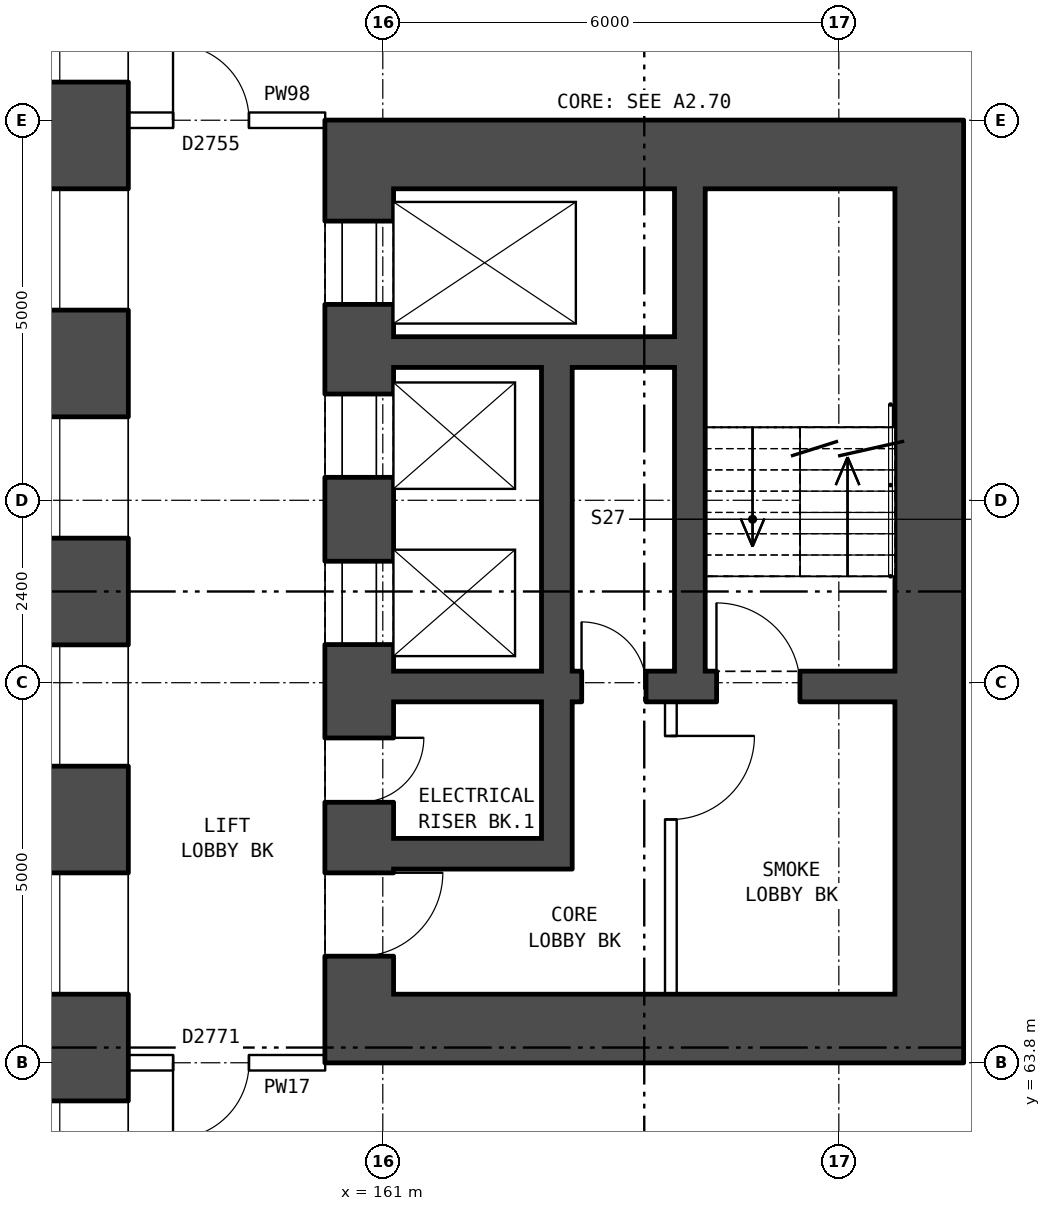
"""IFC4 building model, lengths in metres.
Left out: names, types, materials, properties, quantities, classifications, styles, units other than length and angle.
Written with IfcOpenShell. Run it as: python <this file> out.ifc"""

import sys

from ifc_helpers import new_model, si_unit, direction, frame, frame_2d, origin, place, context, subcontext, project, spatial, rectangle, extrude, element, fill, save


model = new_model("IFC4")
c1 = context("Model", 3, precision=1e-05, world=origin(), true_north=direction((0.0, 1.0)))
c2 = subcontext(c1, "Body", "Model", "MODEL_VIEW")
j1 = project(units=[si_unit("LENGTHUNIT", "METRE"), si_unit("PLANEANGLEUNIT", "RADIAN")], contexts=[c1])
p1 = place(None, origin())
s1 = spatial("IfcSite", under=j1, at=p1, CompositionType="ELEMENT")
p2 = place(p1, origin())
s2 = spatial("IfcBuilding", under=s1, at=p2, CompositionType="ELEMENT")
p3 = place(p2, origin())
s3 = spatial("IfcBuildingStorey", under=s2, at=p3, CompositionType="ELEMENT", Elevation=0.0)
p4 = place(p3, frame((157.05, 56.4, -0.35), z_axis=(0.0, 0.0, 1.0), x_axis=(0.0, 1.0, 0.0)))
e1 = element("IfcWall", 1, at=p4, inside=s3, PredefinedType="SHEAR", context=c2, shape_type="SweptSolid", body=[
    extrude(rectangle(XDim=27.2, YDim=1.2, at=frame_2d((13.6, 0.0))), origin(), (0.0, 0.0, 1.0), 5.55),
])
p5 = place(p4, frame((2.3, 0.0, 0.8)))
e2 = element("IfcOpeningElement", 2, at=p5, cuts=e1, PredefinedType="OPENING", context=c2, shape_type="SweptSolid", body=[
    extrude(rectangle(XDim=1.6, YDim=1.8, at=frame_2d((0.8, 0.9))), frame((0.0, 0.61, 0.0), z_axis=(0.0, -1.0, 0.0), x_axis=(1.0, 0.0, 0.0)), (0.0, 0.0, 1.0), 1.22),
])
p6 = place(p4, frame((5.3, 0.0, 0.8)))
e3 = element("IfcOpeningElement", 3, at=p6, cuts=e1, PredefinedType="OPENING", context=c2, shape_type="SweptSolid", body=[
    extrude(rectangle(XDim=1.6, YDim=1.8, at=frame_2d((0.8, 0.9))), frame((0.0, 0.61, 0.0), z_axis=(0.0, -1.0, 0.0), x_axis=(1.0, 0.0, 0.0)), (0.0, 0.0, 1.0), 1.22),
])
p7 = place(p4, frame((8.3, 0.0, 0.8)))
e4 = element("IfcOpeningElement", 4, at=p7, cuts=e1, PredefinedType="OPENING", context=c2, shape_type="SweptSolid", body=[
    extrude(rectangle(XDim=1.6, YDim=1.8, at=frame_2d((0.8, 0.9))), frame((0.0, 0.61, 0.0), z_axis=(0.0, -1.0, 0.0), x_axis=(1.0, 0.0, 0.0)), (0.0, 0.0, 1.0), 1.22),
])
p8 = place(p4, frame((11.3, 0.0, 0.8)))
e5 = element("IfcOpeningElement", 5, at=p8, cuts=e1, PredefinedType="OPENING", context=c2, shape_type="SweptSolid", body=[
    extrude(rectangle(XDim=1.6, YDim=1.8, at=frame_2d((0.8, 0.9))), frame((0.0, 0.61, 0.0), z_axis=(0.0, -1.0, 0.0), x_axis=(1.0, 0.0, 0.0)), (0.0, 0.0, 1.0), 1.22),
])
p9 = place(p4, frame((14.3, 0.0, 0.8)))
e6 = element("IfcOpeningElement", 6, at=p9, cuts=e1, PredefinedType="OPENING", context=c2, shape_type="SweptSolid", body=[
    extrude(rectangle(XDim=1.6, YDim=1.8, at=frame_2d((0.8, 0.9))), frame((0.0, 0.61, 0.0), z_axis=(0.0, -1.0, 0.0), x_axis=(1.0, 0.0, 0.0)), (0.0, 0.0, 1.0), 1.22),
])
p10 = place(p4, frame((17.3, 0.0, 0.8)))
e7 = element("IfcOpeningElement", 7, at=p10, cuts=e1, PredefinedType="OPENING", context=c2, shape_type="SweptSolid", body=[
    extrude(rectangle(XDim=1.6, YDim=1.8, at=frame_2d((0.8, 0.9))), frame((0.0, 0.61, 0.0), z_axis=(0.0, -1.0, 0.0), x_axis=(1.0, 0.0, 0.0)), (0.0, 0.0, 1.0), 1.22),
])
p11 = place(p4, frame((20.3, 0.0, 0.8)))
e8 = element("IfcOpeningElement", 8, at=p11, cuts=e1, PredefinedType="OPENING", context=c2, shape_type="SweptSolid", body=[
    extrude(rectangle(XDim=1.6, YDim=1.8, at=frame_2d((0.8, 0.9))), frame((0.0, 0.61, 0.0), z_axis=(0.0, -1.0, 0.0), x_axis=(1.0, 0.0, 0.0)), (0.0, 0.0, 1.0), 1.22),
])
p12 = place(p4, frame((23.3, 0.0, 0.8)))
e9 = element("IfcOpeningElement", 9, at=p12, cuts=e1, PredefinedType="OPENING", context=c2, shape_type="SweptSolid", body=[
    extrude(rectangle(XDim=1.6, YDim=1.8, at=frame_2d((0.8, 0.9))), frame((0.0, 0.61, 0.0), z_axis=(0.0, -1.0, 0.0), x_axis=(1.0, 0.0, 0.0)), (0.0, 0.0, 1.0), 1.22),
])
p13 = place(p3, frame((160.69, 75.3, 0.0), z_axis=(0.0, 0.0, 1.0), x_axis=(0.0, -1.0, 0.0)))
e10 = element("IfcWall", 10, at=p13, inside=s3, PredefinedType="SHEAR", context=c2, shape_type="SweptSolid", body=[
    extrude(rectangle(XDim=10.6, YDim=0.9, at=frame_2d((5.3, 0.0))), origin(), (0.0, 0.0, 1.0), 5.2),
])
p14 = place(p13, frame((0.425, 0.0, 0.0)))
e11 = element("IfcOpeningElement", 11, at=p14, cuts=e10, PredefinedType="OPENING", context=c2, shape_type="SweptSolid", body=[
    extrude(rectangle(XDim=1.1, YDim=2.1, at=frame_2d((0.55, 1.05))), frame((0.0, 0.46, 0.0), z_axis=(0.0, -1.0, 0.0), x_axis=(1.0, 0.0, 0.0)), (0.0, 0.0, 1.0), 0.92),
])
p15 = place(p13, frame((2.7, 0.0, 0.0)))
e12 = element("IfcOpeningElement", 12, at=p15, cuts=e10, PredefinedType="OPENING", context=c2, shape_type="SweptSolid", body=[
    extrude(rectangle(XDim=1.1, YDim=2.1, at=frame_2d((0.55, 1.05))), frame((0.0, 0.46, 0.0), z_axis=(0.0, -1.0, 0.0), x_axis=(1.0, 0.0, 0.0)), (0.0, 0.0, 1.0), 0.92),
])
p16 = place(p13, frame((4.9, 0.0, 0.0)))
e13 = element("IfcOpeningElement", 13, at=p16, cuts=e10, PredefinedType="OPENING", context=c2, shape_type="SweptSolid", body=[
    extrude(rectangle(XDim=1.1, YDim=2.1, at=frame_2d((0.55, 1.05))), frame((0.0, 0.46, 0.0), z_axis=(0.0, -1.0, 0.0), x_axis=(1.0, 0.0, 0.0)), (0.0, 0.0, 1.0), 0.92),
])
p17 = place(p13, frame((9.0, 0.0, 0.0)))
e14 = element("IfcOpeningElement", 14, at=p17, cuts=e10, PredefinedType="OPENING", context=c2, shape_type="SweptSolid", body=[
    extrude(rectangle(XDim=1.1, YDim=2.1, at=frame_2d((0.55, 1.05))), frame((0.0, 0.46, 0.0), z_axis=(0.0, -1.0, 0.0), x_axis=(1.0, 0.0, 0.0)), (0.0, 0.0, 1.0), 0.92),
])
p18 = place(p13, frame((7.225, 0.0, 0.0)))
e15 = element("IfcOpeningElement", 15, at=p18, cuts=e10, PredefinedType="OPENING", context=c2, shape_type="SweptSolid", body=[
    extrude(rectangle(XDim=0.85, YDim=2.1, at=frame_2d((0.425, 1.05))), frame((0.0, 0.46, 0.0), z_axis=(0.0, -1.0, 0.0), x_axis=(1.0, 0.0, 0.0)), (0.0, 0.0, 1.0), 0.92),
])
p19 = place(p3, frame((168.19, 75.3, 0.0), z_axis=(0.0, 0.0, 1.0), x_axis=(0.0, -1.0, 0.0)))
e16 = element("IfcWall", 16, at=p19, inside=s3, PredefinedType="SHEAR", context=c2, shape_type="SweptSolid", body=[
    extrude(rectangle(XDim=10.6, YDim=0.9, at=frame_2d((5.3, 0.0))), origin(), (0.0, 0.0, 1.0), 5.2),
])
for number, where, z_axis, x_axis in (
    (17, (160.24, 75.75, 0.0), (0.0, 0.0, 1.0), (1.0, 0.0, 0.0)),
    (18, (160.24, 64.25, 0.0), (0.0, 0.0, 1.0), (1.0, 0.0, 0.0)),
):
    element("IfcWall", number, at=place(p3, frame(where, z_axis=z_axis, x_axis=x_axis)), inside=s3, PredefinedType="SHEAR", context=c2, shape_type="SweptSolid", body=[
        extrude(rectangle(XDim=8.4, YDim=0.9, at=frame_2d((4.2, 0.0))), origin(), (0.0, 0.0, 1.0), 5.2),
    ])
p20 = place(p3, frame((161.14, 73.15, 0.0), z_axis=(0.0, 0.0, 1.0), x_axis=(1.0, 0.0, 0.0)))
e19 = element("IfcWall", 19, at=p20, inside=s3, PredefinedType="SHEAR", context=c2, shape_type="SweptSolid", body=[
    extrude(rectangle(XDim=3.7, YDim=0.4, at=frame_2d((1.85, 0.0))), origin(), (0.0, 0.0, 1.0), 5.2),
])
p21 = place(p3, frame((161.14, 68.75, 0.0), z_axis=(0.0, 0.0, 1.0), x_axis=(1.0, 0.0, 0.0)))
e20 = element("IfcWall", 20, at=p21, inside=s3, PredefinedType="SHEAR", context=c2, shape_type="SweptSolid", body=[
    extrude(rectangle(XDim=6.6, YDim=0.4, at=frame_2d((3.3, 0.0))), origin(), (0.0, 0.0, 1.0), 5.2),
])
p22 = place(p21, frame((4.25, 0.0, 0.0)))
e21 = element("IfcOpeningElement", 21, at=p22, cuts=e20, PredefinedType="OPENING", context=c2, shape_type="SweptSolid", body=[
    extrude(rectangle(XDim=1.1, YDim=2.1, at=frame_2d((0.55, 1.05))), frame((0.0, 0.21, 0.0), z_axis=(0.0, -1.0, 0.0), x_axis=(1.0, 0.0, 0.0)), (0.0, 0.0, 1.0), 0.42),
])
p23 = place(p21, frame((2.475, 0.0, 0.0)))
e22 = element("IfcOpeningElement", 22, at=p23, cuts=e20, PredefinedType="OPENING", context=c2, shape_type="SweptSolid", body=[
    extrude(rectangle(XDim=0.85, YDim=2.1, at=frame_2d((0.425, 1.05))), frame((0.0, 0.21, 0.0), z_axis=(0.0, -1.0, 0.0), x_axis=(1.0, 0.0, 0.0)), (0.0, 0.0, 1.0), 0.42),
])
p24 = place(p3, frame((161.14, 66.55, 0.0), z_axis=(0.0, 0.0, 1.0), x_axis=(1.0, 0.0, 0.0)))
e23 = element("IfcWall", 23, at=p24, inside=s3, PredefinedType="SHEAR", context=c2, shape_type="SweptSolid", body=[
    extrude(rectangle(XDim=1.95, YDim=0.4, at=frame_2d((0.975, 0.0))), origin(), (0.0, 0.0, 1.0), 5.2),
])
p25 = place(p3, frame((163.29, 72.95, 0.0), z_axis=(0.0, 0.0, 1.0), x_axis=(0.0, -1.0, 0.0)))
e24 = element("IfcWall", 24, at=p25, inside=s3, PredefinedType="SHEAR", context=c2, shape_type="SweptSolid", body=[
    extrude(rectangle(XDim=4.0, YDim=0.4, at=frame_2d((2.0, 0.0))), origin(), (0.0, 0.0, 1.0), 5.2),
])
p26 = place(p3, frame((163.29, 68.55, 0.0), z_axis=(0.0, 0.0, 1.0), x_axis=(0.0, -1.0, 0.0)))
e25 = element("IfcWall", 25, at=p26, inside=s3, PredefinedType="SHEAR", context=c2, shape_type="SweptSolid", body=[
    extrude(rectangle(XDim=2.2, YDim=0.4, at=frame_2d((1.1, 0.0))), origin(), (0.0, 0.0, 1.0), 5.2),
])
p27 = place(p3, frame((164.79, 68.55, 0.0), z_axis=(0.0, 0.0, 1.0), x_axis=(0.0, -1.0, 0.0)))
e26 = element("IfcWall", 26, at=p27, inside=s3, PredefinedType="PARTITIONING", context=c2, shape_type="SweptSolid", body=[
    extrude(rectangle(XDim=3.85, YDim=0.15, at=frame_2d((1.925, 0.0))), origin(), (0.0, 0.0, 1.0), 5.2),
])
p28 = place(p27, frame((0.45, 0.0, 0.0)))
e27 = element("IfcOpeningElement", 27, at=p28, cuts=e26, PredefinedType="OPENING", context=c2, shape_type="SweptSolid", body=[
    extrude(rectangle(XDim=1.1, YDim=2.1, at=frame_2d((0.55, 1.05))), frame((0.0, 0.085, 0.0), z_axis=(0.0, -1.0, 0.0), x_axis=(1.0, 0.0, 0.0)), (0.0, 0.0, 1.0), 0.17),
])
p29 = place(p3, frame((165.04, 75.3, 0.0), z_axis=(0.0, 0.0, 1.0), x_axis=(0.0, -1.0, 0.0)))
e28 = element("IfcWall", 28, at=p29, inside=s3, PredefinedType="SHEAR", context=c2, shape_type="SweptSolid", body=[
    extrude(rectangle(XDim=6.35, YDim=0.4, at=frame_2d((3.175, 0.0))), origin(), (0.0, 0.0, 1.0), 5.2),
])
p30 = place(p3, frame((157.65, 63.8, 0.0), z_axis=(0.0, 0.0, 1.0), x_axis=(1.0, 0.0, 0.0)))
e29 = element("IfcWall", 29, at=p30, inside=s3, PredefinedType="PARTITIONING", context=c2, shape_type="SweptSolid", body=[
    extrude(rectangle(XDim=2.59, YDim=0.2, at=frame_2d((1.295, 0.0))), origin(), (0.0, 0.0, 1.0), 5.2),
])
p31 = place(p30, frame((0.59, 0.0, 0.0)))
e30 = element("IfcOpeningElement", 30, at=p31, cuts=e29, PredefinedType="OPENING", context=c2, shape_type="SweptSolid", body=[
    extrude(rectangle(XDim=1.0, YDim=2.1, at=frame_2d((0.5, 1.05))), frame((0.0, 0.11, 0.0), z_axis=(0.0, -1.0, 0.0), x_axis=(1.0, 0.0, 0.0)), (0.0, 0.0, 1.0), 0.22),
])
p32 = place(p3, frame((157.65, 76.2, 0.0), z_axis=(0.0, 0.0, 1.0), x_axis=(1.0, 0.0, 0.0)))
e31 = element("IfcWall", 31, at=p32, inside=s3, PredefinedType="PARTITIONING", context=c2, shape_type="SweptSolid", body=[
    extrude(rectangle(XDim=2.59, YDim=0.2, at=frame_2d((1.295, 0.0))), origin(), (0.0, 0.0, 1.0), 5.2),
])
p33 = place(p32, frame((0.59, 0.0, 0.0)))
e32 = element("IfcOpeningElement", 32, at=p33, cuts=e31, PredefinedType="OPENING", context=c2, shape_type="SweptSolid", body=[
    extrude(rectangle(XDim=1.0, YDim=2.1, at=frame_2d((0.5, 1.05))), frame((0.0, 0.11, 0.0), z_axis=(0.0, -1.0, 0.0), x_axis=(1.0, 0.0, 0.0)), (0.0, 0.0, 1.0), 0.22),
])
p34 = place(p6, origin())
e33 = element("IfcWindow", 33, at=p34, inside=s3, PartitioningType="SINGLE_PANEL", PredefinedType="WINDOW", context=c2, shape_type="SweptSolid", body=[
    extrude(rectangle(XDim=1.6, YDim=1.8, at=frame_2d((0.8, 0.9))), frame((0.0, 0.33, 0.0), z_axis=(0.0, -1.0, 0.0), x_axis=(1.0, 0.0, 0.0)), (0.0, 0.0, 1.0), 0.06),
])
fill(e3, e33)
p35 = place(p7, origin())
e34 = element("IfcWindow", 34, at=p35, inside=s3, PartitioningType="SINGLE_PANEL", PredefinedType="WINDOW", context=c2, shape_type="SweptSolid", body=[
    extrude(rectangle(XDim=1.6, YDim=1.8, at=frame_2d((0.8, 0.9))), frame((0.0, 0.33, 0.0), z_axis=(0.0, -1.0, 0.0), x_axis=(1.0, 0.0, 0.0)), (0.0, 0.0, 1.0), 0.06),
])
fill(e4, e34)
p36 = place(p8, origin())
e35 = element("IfcWindow", 35, at=p36, inside=s3, PartitioningType="SINGLE_PANEL", PredefinedType="WINDOW", context=c2, shape_type="SweptSolid", body=[
    extrude(rectangle(XDim=1.6, YDim=1.8, at=frame_2d((0.8, 0.9))), frame((0.0, 0.33, 0.0), z_axis=(0.0, -1.0, 0.0), x_axis=(1.0, 0.0, 0.0)), (0.0, 0.0, 1.0), 0.06),
])
fill(e5, e35)
p37 = place(p9, origin())
e36 = element("IfcWindow", 36, at=p37, inside=s3, PartitioningType="SINGLE_PANEL", PredefinedType="WINDOW", context=c2, shape_type="SweptSolid", body=[
    extrude(rectangle(XDim=1.6, YDim=1.8, at=frame_2d((0.8, 0.9))), frame((0.0, 0.33, 0.0), z_axis=(0.0, -1.0, 0.0), x_axis=(1.0, 0.0, 0.0)), (0.0, 0.0, 1.0), 0.06),
])
fill(e6, e36)
p38 = place(p10, origin())
e37 = element("IfcWindow", 37, at=p38, inside=s3, PartitioningType="SINGLE_PANEL", PredefinedType="WINDOW", context=c2, shape_type="SweptSolid", body=[
    extrude(rectangle(XDim=1.6, YDim=1.8, at=frame_2d((0.8, 0.9))), frame((0.0, 0.33, 0.0), z_axis=(0.0, -1.0, 0.0), x_axis=(1.0, 0.0, 0.0)), (0.0, 0.0, 1.0), 0.06),
])
fill(e7, e37)
p39 = place(p11, origin())
e38 = element("IfcWindow", 38, at=p39, inside=s3, PartitioningType="SINGLE_PANEL", PredefinedType="WINDOW", context=c2, shape_type="SweptSolid", body=[
    extrude(rectangle(XDim=1.6, YDim=1.8, at=frame_2d((0.8, 0.9))), frame((0.0, 0.33, 0.0), z_axis=(0.0, -1.0, 0.0), x_axis=(1.0, 0.0, 0.0)), (0.0, 0.0, 1.0), 0.06),
])
fill(e8, e38)
p40 = place(p14, origin())
e39 = element("IfcDoor", 39, at=p40, inside=s3, OperationType="DOUBLE_DOOR_SLIDING", PredefinedType="DOOR", context=c2, shape_type="SweptSolid", body=[
    extrude(rectangle(XDim=1.1, YDim=2.1, at=frame_2d((0.55, 1.05))), frame((0.0, 0.435, 0.0), z_axis=(0.0, -1.0, 0.0), x_axis=(1.0, 0.0, 0.0)), (0.0, 0.0, 1.0), 0.05),
])
fill(e11, e39)
p41 = place(p15, origin())
e40 = element("IfcDoor", 40, at=p41, inside=s3, OperationType="DOUBLE_DOOR_SLIDING", PredefinedType="DOOR", context=c2, shape_type="SweptSolid", body=[
    extrude(rectangle(XDim=1.1, YDim=2.1, at=frame_2d((0.55, 1.05))), frame((0.0, 0.435, 0.0), z_axis=(0.0, -1.0, 0.0), x_axis=(1.0, 0.0, 0.0)), (0.0, 0.0, 1.0), 0.05),
])
fill(e12, e40)
p42 = place(p16, origin())
e41 = element("IfcDoor", 41, at=p42, inside=s3, OperationType="DOUBLE_DOOR_SLIDING", PredefinedType="DOOR", context=c2, shape_type="SweptSolid", body=[
    extrude(rectangle(XDim=1.1, YDim=2.1, at=frame_2d((0.55, 1.05))), frame((0.0, 0.435, 0.0), z_axis=(0.0, -1.0, 0.0), x_axis=(1.0, 0.0, 0.0)), (0.0, 0.0, 1.0), 0.05),
])
fill(e13, e41)
p43 = place(p17, origin())
e42 = element("IfcDoor", 42, at=p43, inside=s3, OperationType="SINGLE_SWING_LEFT", PredefinedType="DOOR", context=c2, shape_type="SweptSolid", body=[
    extrude(rectangle(XDim=1.1, YDim=2.1, at=frame_2d((0.55, 1.05))), frame((0.0, 0.025, 0.0), z_axis=(0.0, -1.0, 0.0), x_axis=(1.0, 0.0, 0.0)), (0.0, 0.0, 1.0), 0.05),
])
fill(e14, e42)
p44 = place(p28, origin())
e43 = element("IfcDoor", 43, at=p44, inside=s3, OperationType="SINGLE_SWING_LEFT", PredefinedType="DOOR", context=c2, shape_type="SweptSolid", body=[
    extrude(rectangle(XDim=1.1, YDim=2.1, at=frame_2d((0.55, 1.05))), frame((0.0, 0.025, 0.0), z_axis=(0.0, -1.0, 0.0), x_axis=(1.0, 0.0, 0.0)), (0.0, 0.0, 1.0), 0.05),
])
fill(e27, e43)
p45 = place(p22, origin())
e44 = element("IfcDoor", 44, at=p45, inside=s3, OperationType="SINGLE_SWING_LEFT", PredefinedType="DOOR", context=c2, shape_type="SweptSolid", body=[
    extrude(rectangle(XDim=1.1, YDim=2.1, at=frame_2d((0.55, 1.05))), frame((0.0, 0.025, 0.0), z_axis=(0.0, -1.0, 0.0), x_axis=(1.0, 0.0, 0.0)), (0.0, 0.0, 1.0), 0.05),
])
fill(e21, e44)
p46 = place(p18, origin())
e45 = element("IfcDoor", 45, at=p46, inside=s3, OperationType="SINGLE_SWING_LEFT", PredefinedType="DOOR", context=c2, shape_type="SweptSolid", body=[
    extrude(rectangle(XDim=0.85, YDim=2.1, at=frame_2d((0.425, 1.05))), frame((0.0, 0.435, 0.0), z_axis=(0.0, -1.0, 0.0), x_axis=(1.0, 0.0, 0.0)), (0.0, 0.0, 1.0), 0.05),
])
fill(e15, e45)
p47 = place(p23, origin())
e46 = element("IfcDoor", 46, at=p47, inside=s3, OperationType="SINGLE_SWING_LEFT", PredefinedType="DOOR", context=c2, shape_type="SweptSolid", body=[
    extrude(rectangle(XDim=0.85, YDim=2.1, at=frame_2d((0.425, 1.05))), frame((0.0, 0.025, 0.0), z_axis=(0.0, -1.0, 0.0), x_axis=(1.0, 0.0, 0.0)), (0.0, 0.0, 1.0), 0.05),
])
fill(e22, e46)
p48 = place(p31, frame((1.0, 0.0, 0.0), z_axis=(0.0, 0.0, 1.0), x_axis=(-1.0, 0.0, 0.0)))
e47 = element("IfcDoor", 47, at=p48, inside=s3, OperationType="SINGLE_SWING_RIGHT", PredefinedType="DOOR", context=c2, shape_type="SweptSolid", body=[
    extrude(rectangle(XDim=1.0, YDim=2.1, at=frame_2d((0.5, 1.05))), frame((0.0, 0.025, 0.0), z_axis=(0.0, -1.0, 0.0), x_axis=(1.0, 0.0, 0.0)), (0.0, 0.0, 1.0), 0.05),
])
fill(e30, e47)
p49 = place(p33, origin())
e48 = element("IfcDoor", 48, at=p49, inside=s3, OperationType="SINGLE_SWING_LEFT", PredefinedType="DOOR", context=c2, shape_type="SweptSolid", body=[
    extrude(rectangle(XDim=1.0, YDim=2.1, at=frame_2d((0.5, 1.05))), frame((0.0, 0.025, 0.0), z_axis=(0.0, -1.0, 0.0), x_axis=(1.0, 0.0, 0.0)), (0.0, 0.0, 1.0), 0.05),
])
fill(e32, e48)
save(model, sys.argv[1])
